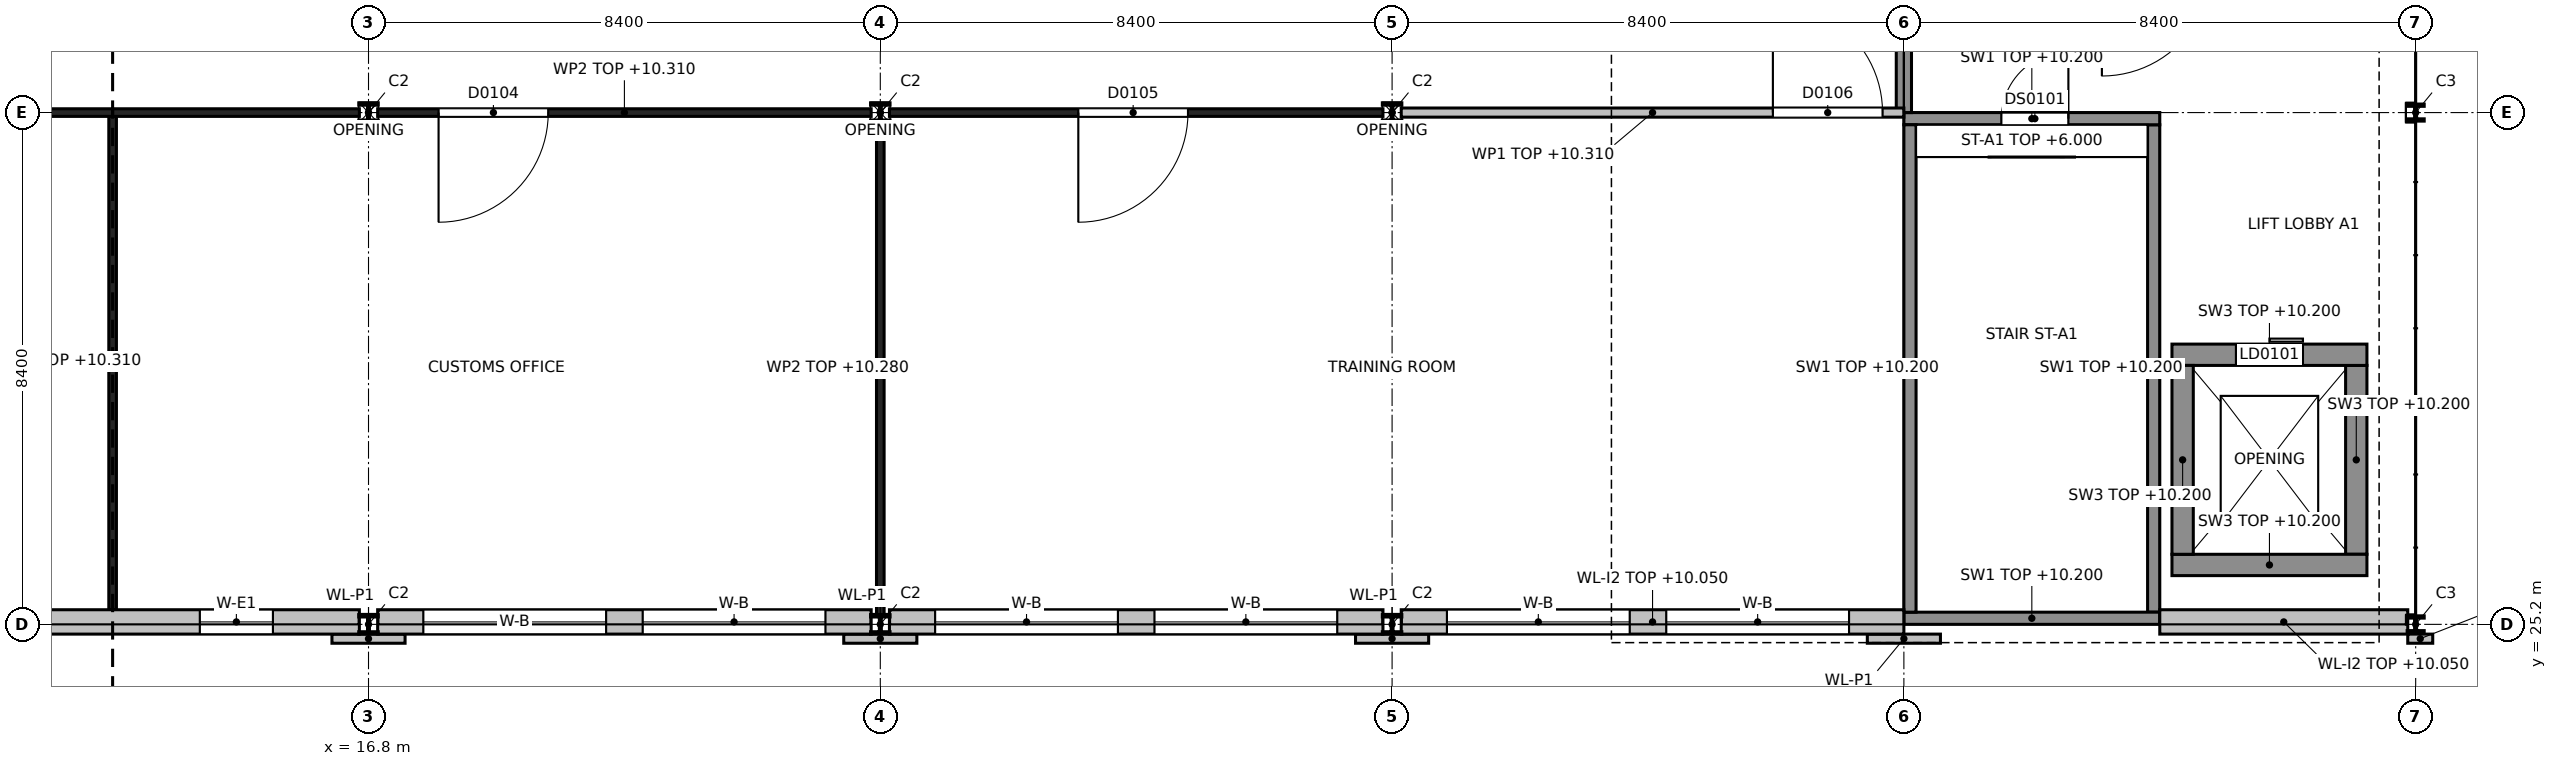
"""IFC4 building model, lengths in metres.
Left out: names, types, materials, properties, quantities, classifications, styles, units other than length and angle.
Written with IfcOpenShell. Run it as: python <this file> out.ifc"""

import sys

from ifc_helpers import new_model, si_unit, direction, frame, frame_2d, origin, origin_2d, place, context, subcontext, project, spatial, rectangle, i_section, extrude, element, fill, save


model = new_model("IFC4")
c1 = context("Model", 3, precision=1e-05, world=origin(), true_north=direction((0.0, 1.0)))
c2 = subcontext(c1, "Body", "Model", "MODEL_VIEW")
j1 = project(units=[si_unit("LENGTHUNIT", "METRE"), si_unit("PLANEANGLEUNIT", "RADIAN")], contexts=[c1])
p1 = place(None, origin())
s1 = spatial("IfcSite", under=j1, at=p1, CompositionType="ELEMENT")
p2 = place(p1, origin())
s2 = spatial("IfcBuilding", under=s1, at=p2, CompositionType="ELEMENT")
p3 = place(p2, frame((0.0, 0.0, 6.0)))
s3 = spatial("IfcBuildingStorey", under=s2, at=p3, CompositionType="ELEMENT", Elevation=6.0)
for number, where, z_axis, x_axis in (
    (1, (16.8, 25.2, 0.0), (0.0, 0.0, 1.0), (1.0, 0.0, 0.0)),
    (2, (16.8, 33.6, 0.0), (0.0, 0.0, 1.0), (1.0, 0.0, 0.0)),
    (3, (25.2, 25.2, 0.0), (0.0, 0.0, 1.0), (1.0, 0.0, 0.0)),
    (4, (25.2, 33.6, 0.0), (0.0, 0.0, 1.0), (1.0, 0.0, 0.0)),
    (5, (33.6, 25.2, 0.0), (0.0, 0.0, 1.0), (1.0, 0.0, 0.0)),
    (6, (33.6, 33.6, 0.0), (0.0, 0.0, 1.0), (1.0, 0.0, 0.0)),
):
    element("IfcColumn", number, at=place(p3, frame(where, z_axis=z_axis, x_axis=x_axis)), inside=s3, PredefinedType="COLUMN", context=c2, shape_type="SweptSolid", body=[
        extrude(i_section(OverallWidth=0.3, OverallDepth=0.3, WebThickness=0.011, FlangeThickness=0.019, at=origin_2d()), origin(), (0.0, 0.0, 1.0), 4.8),
    ])
for number, where, z_axis, x_axis in (
    (7, (50.4, 25.2, 0.0), (0.0, 0.0, 1.0), (1.0, 0.0, 0.0)),
    (8, (50.4, 33.6, 0.0), (0.0, 0.0, 1.0), (1.0, 0.0, 0.0)),
):
    element("IfcColumn", number, at=place(p3, frame(where, z_axis=z_axis, x_axis=x_axis)), inside=s3, PredefinedType="COLUMN", context=c2, shape_type="SweptSolid", body=[
        extrude(i_section(OverallWidth=0.26, OverallDepth=0.26, WebThickness=0.01, FlangeThickness=0.018, at=origin_2d()), origin(), (0.0, 0.0, 1.0), 4.8),
    ])
p4 = place(p3, frame((42.0, 25.3, 0.0), z_axis=(0.0, 0.0, 1.0), x_axis=(1.0, 0.0, 0.0)))
e9 = element("IfcWall", 9, at=p4, inside=s3, PredefinedType="SHEAR", context=c2, shape_type="SweptSolid", body=[
    extrude(rectangle(XDim=4.2, YDim=0.2, at=frame_2d((2.1, 0.0))), origin(), (0.0, 0.0, 1.0), 4.2),
])
p5 = place(p3, frame((42.0, 33.5, 0.0), z_axis=(0.0, 0.0, 1.0), x_axis=(1.0, 0.0, 0.0)))
e10 = element("IfcWall", 10, at=p5, inside=s3, PredefinedType="SHEAR", context=c2, shape_type="SweptSolid", body=[
    extrude(rectangle(XDim=4.2, YDim=0.2, at=frame_2d((2.1, 0.0))), origin(), (0.0, 0.0, 1.0), 4.2),
])
p6 = place(p5, frame((1.6, 0.0, 0.0)))
e11 = element("IfcOpeningElement", 11, at=p6, cuts=e10, PredefinedType="OPENING", context=c2, shape_type="SweptSolid", body=[
    extrude(rectangle(XDim=1.1, YDim=2.1, at=frame_2d((0.55, 1.05))), frame((0.0, 0.1, 0.0), z_axis=(0.0, -1.0, 0.0), x_axis=(1.0, 0.0, 0.0)), (0.0, 0.0, 1.0), 0.2),
])
for number, where, z_axis, x_axis in (
    (12, (42.1, 25.4, 0.0), (0.0, 0.0, 1.0), (0.0, 1.0, 0.0)),
    (13, (46.1, 25.4, 0.0), (0.0, 0.0, 1.0), (0.0, 1.0, 0.0)),
):
    element("IfcWall", number, at=place(p3, frame(where, z_axis=z_axis, x_axis=x_axis)), inside=s3, PredefinedType="SHEAR", context=c2, shape_type="SweptSolid", body=[
        extrude(rectangle(XDim=8.0, YDim=0.2, at=frame_2d((4.0, 0.0))), origin(), (0.0, 0.0, 1.0), 4.2),
    ])
p7 = place(p3, frame((46.4, 26.175, 0.0), z_axis=(0.0, 0.0, 1.0), x_axis=(1.0, 0.0, 0.0)))
e14 = element("IfcWall", 14, at=p7, inside=s3, PredefinedType="SHEAR", context=c2, shape_type="SweptSolid", body=[
    extrude(rectangle(XDim=3.2, YDim=0.35, at=frame_2d((1.6, 0.0))), origin(), (0.0, 0.0, 1.0), 4.2),
])
p8 = place(p3, frame((46.4, 29.625, 0.0), z_axis=(0.0, 0.0, 1.0), x_axis=(1.0, 0.0, 0.0)))
e15 = element("IfcWall", 15, at=p8, inside=s3, PredefinedType="SHEAR", context=c2, shape_type="SweptSolid", body=[
    extrude(rectangle(XDim=3.2, YDim=0.35, at=frame_2d((1.6, 0.0))), origin(), (0.0, 0.0, 1.0), 4.2),
])
p9 = place(p8, frame((1.05, 0.0, 0.0)))
e16 = element("IfcOpeningElement", 16, at=p9, cuts=e15, PredefinedType="OPENING", context=c2, shape_type="SweptSolid", body=[
    extrude(rectangle(XDim=1.1, YDim=2.1, at=frame_2d((0.55, 1.05))), frame((0.0, 0.175, 0.0), z_axis=(0.0, -1.0, 0.0), x_axis=(1.0, 0.0, 0.0)), (0.0, 0.0, 1.0), 0.35),
])
for number, where, z_axis, x_axis in (
    (17, (46.575, 26.35, 0.0), (0.0, 0.0, 1.0), (0.0, 1.0, 0.0)),
    (18, (49.425, 26.35, 0.0), (0.0, 0.0, 1.0), (0.0, 1.0, 0.0)),
):
    element("IfcWall", number, at=place(p3, frame(where, z_axis=z_axis, x_axis=x_axis)), inside=s3, PredefinedType="SHEAR", context=c2, shape_type="SweptSolid", body=[
        extrude(rectangle(XDim=3.1, YDim=0.35, at=frame_2d((1.55, 0.0))), origin(), (0.0, 0.0, 1.0), 4.2),
    ])
p10 = place(p3, frame((8.55, 25.24, 0.0), z_axis=(0.0, 0.0, 1.0), x_axis=(1.0, 0.0, 0.0)))
e19 = element("IfcWall", 19, at=p10, inside=s3, PredefinedType="SOLIDWALL", context=c2, shape_type="SweptSolid", body=[
    extrude(rectangle(XDim=8.1, YDim=0.4, at=frame_2d((4.05, 0.0))), origin(), (0.0, 0.0, 1.0), 4.05),
])
p11 = place(p10, frame((1.419, 0.0, 0.9)))
e20 = element("IfcOpeningElement", 20, at=p11, cuts=e19, PredefinedType="OPENING", context=c2, shape_type="SweptSolid", body=[
    extrude(rectangle(XDim=1.2, YDim=3.0, at=frame_2d((0.6, 1.5))), frame((0.0, 0.2, 0.0), z_axis=(0.0, -1.0, 0.0), x_axis=(1.0, 0.0, 0.0)), (0.0, 0.0, 1.0), 0.4),
])
p12 = place(p10, frame((5.481, 0.0, 0.9)))
e21 = element("IfcOpeningElement", 21, at=p12, cuts=e19, PredefinedType="OPENING", context=c2, shape_type="SweptSolid", body=[
    extrude(rectangle(XDim=1.2, YDim=3.0, at=frame_2d((0.6, 1.5))), frame((0.0, 0.2, 0.0), z_axis=(0.0, -1.0, 0.0), x_axis=(1.0, 0.0, 0.0)), (0.0, 0.0, 1.0), 0.4),
])
p13 = place(p3, frame((16.95, 25.24, 0.0), z_axis=(0.0, 0.0, 1.0), x_axis=(1.0, 0.0, 0.0)))
e22 = element("IfcWall", 22, at=p13, inside=s3, PredefinedType="SOLIDWALL", context=c2, shape_type="SweptSolid", body=[
    extrude(rectangle(XDim=8.1, YDim=0.4, at=frame_2d((4.05, 0.0))), origin(), (0.0, 0.0, 1.0), 4.05),
])
p14 = place(p13, frame((0.75, 0.0, 0.9)))
e23 = element("IfcOpeningElement", 23, at=p14, cuts=e22, PredefinedType="OPENING", context=c2, shape_type="SweptSolid", body=[
    extrude(rectangle(XDim=3.0, YDim=3.0, at=frame_2d((1.5, 1.5))), frame((0.0, 0.2, 0.0), z_axis=(0.0, -1.0, 0.0), x_axis=(1.0, 0.0, 0.0)), (0.0, 0.0, 1.0), 0.4),
])
p15 = place(p13, frame((4.35, 0.0, 0.9)))
e24 = element("IfcOpeningElement", 24, at=p15, cuts=e22, PredefinedType="OPENING", context=c2, shape_type="SweptSolid", body=[
    extrude(rectangle(XDim=3.0, YDim=3.0, at=frame_2d((1.5, 1.5))), frame((0.0, 0.2, 0.0), z_axis=(0.0, -1.0, 0.0), x_axis=(1.0, 0.0, 0.0)), (0.0, 0.0, 1.0), 0.4),
])
p16 = place(p3, frame((25.35, 25.24, 0.0), z_axis=(0.0, 0.0, 1.0), x_axis=(1.0, 0.0, 0.0)))
e25 = element("IfcWall", 25, at=p16, inside=s3, PredefinedType="SOLIDWALL", context=c2, shape_type="SweptSolid", body=[
    extrude(rectangle(XDim=8.1, YDim=0.4, at=frame_2d((4.05, 0.0))), origin(), (0.0, 0.0, 1.0), 4.05),
])
p17 = place(p16, frame((0.75, 0.0, 0.9)))
e26 = element("IfcOpeningElement", 26, at=p17, cuts=e25, PredefinedType="OPENING", context=c2, shape_type="SweptSolid", body=[
    extrude(rectangle(XDim=3.0, YDim=3.0, at=frame_2d((1.5, 1.5))), frame((0.0, 0.2, 0.0), z_axis=(0.0, -1.0, 0.0), x_axis=(1.0, 0.0, 0.0)), (0.0, 0.0, 1.0), 0.4),
])
p18 = place(p16, frame((4.35, 0.0, 0.9)))
e27 = element("IfcOpeningElement", 27, at=p18, cuts=e25, PredefinedType="OPENING", context=c2, shape_type="SweptSolid", body=[
    extrude(rectangle(XDim=3.0, YDim=3.0, at=frame_2d((1.5, 1.5))), frame((0.0, 0.2, 0.0), z_axis=(0.0, -1.0, 0.0), x_axis=(1.0, 0.0, 0.0)), (0.0, 0.0, 1.0), 0.4),
])
p19 = place(p3, frame((33.75, 25.24, 0.0), z_axis=(0.0, 0.0, 1.0), x_axis=(1.0, 0.0, 0.0)))
e28 = element("IfcWall", 28, at=p19, inside=s3, PredefinedType="SOLIDWALL", context=c2, shape_type="SweptSolid", body=[
    extrude(rectangle(XDim=8.25, YDim=0.4, at=frame_2d((4.125, 0.0))), origin(), (0.0, 0.0, 1.0), 4.05),
])
p20 = place(p19, frame((0.75, 0.0, 0.9)))
e29 = element("IfcOpeningElement", 29, at=p20, cuts=e28, PredefinedType="OPENING", context=c2, shape_type="SweptSolid", body=[
    extrude(rectangle(XDim=3.0, YDim=3.0, at=frame_2d((1.5, 1.5))), frame((0.0, 0.2, 0.0), z_axis=(0.0, -1.0, 0.0), x_axis=(1.0, 0.0, 0.0)), (0.0, 0.0, 1.0), 0.4),
])
p21 = place(p19, frame((4.35, 0.0, 0.9)))
e30 = element("IfcOpeningElement", 30, at=p21, cuts=e28, PredefinedType="OPENING", context=c2, shape_type="SweptSolid", body=[
    extrude(rectangle(XDim=3.0, YDim=3.0, at=frame_2d((1.5, 1.5))), frame((0.0, 0.2, 0.0), z_axis=(0.0, -1.0, 0.0), x_axis=(1.0, 0.0, 0.0)), (0.0, 0.0, 1.0), 0.4),
])
p22 = place(p3, frame((46.2, 25.24, 0.0), z_axis=(0.0, 0.0, 1.0), x_axis=(1.0, 0.0, 0.0)))
e31 = element("IfcWall", 31, at=p22, inside=s3, PredefinedType="SOLIDWALL", context=c2, shape_type="SweptSolid", body=[
    extrude(rectangle(XDim=4.07, YDim=0.4, at=frame_2d((2.035, 0.0))), origin(), (0.0, 0.0, 1.0), 4.05),
])
for number, where, z_axis, x_axis in (
    (32, (16.2, 24.965, 0.0), (0.0, 0.0, 1.0), (1.0, 0.0, 0.0)),
    (33, (24.6, 24.965, 0.0), (0.0, 0.0, 1.0), (1.0, 0.0, 0.0)),
    (34, (33.0, 24.965, 0.0), (0.0, 0.0, 1.0), (1.0, 0.0, 0.0)),
):
    element("IfcWall", number, at=place(p3, frame(where, z_axis=z_axis, x_axis=x_axis)), inside=s3, PredefinedType="SOLIDWALL", context=c2, shape_type="SweptSolid", body=[
        extrude(rectangle(XDim=1.2, YDim=0.15, at=frame_2d((0.6, 0.0))), origin(), (0.0, 0.0, 1.0), 4.8),
    ])
p23 = place(p3, frame((41.4, 24.965, 0.0), z_axis=(0.0, 0.0, 1.0), x_axis=(1.0, 0.0, 0.0)))
e35 = element("IfcWall", 35, at=p23, inside=s3, PredefinedType="SOLIDWALL", context=c2, shape_type="SweptSolid", body=[
    extrude(rectangle(XDim=1.2, YDim=0.15, at=frame_2d((0.6, 0.0))), origin(), (0.0, 0.0, 1.0), 4.8),
])
p24 = place(p3, frame((50.27, 24.965, 0.0), z_axis=(0.0, 0.0, 1.0), x_axis=(1.0, 0.0, 0.0)))
e36 = element("IfcWall", 36, at=p24, inside=s3, PredefinedType="SOLIDWALL", context=c2, shape_type="SweptSolid", body=[
    extrude(rectangle(XDim=0.41, YDim=0.15, at=frame_2d((0.205, 0.0))), origin(), (0.0, 0.0, 1.0), 4.8),
])
p25 = place(p3, frame((42.0, 33.6, 0.0), z_axis=(0.0, 0.0, 1.0), x_axis=(0.0, 1.0, 0.0)))
e37 = element("IfcWall", 37, at=p25, inside=s3, PredefinedType="PARTITIONING", context=c2, shape_type="SweptSolid", body=[
    extrude(rectangle(XDim=2.4, YDim=0.25, at=frame_2d((1.2, 0.0))), origin(), (0.0, 0.0, 1.0), 4.26),
])
p26 = place(p3, frame((12.6, 25.44, 0.0), z_axis=(0.0, 0.0, 1.0), x_axis=(0.0, 1.0, 0.0)))
e38 = element("IfcWall", 38, at=p26, inside=s3, PredefinedType="PARTITIONING", context=c2, shape_type="SweptSolid", body=[
    extrude(rectangle(XDim=8.16, YDim=0.125, at=frame_2d((4.08, 0.0))), origin(), (0.0, 0.0, 1.0), 4.31),
])
p27 = place(p3, frame((8.55, 33.6, 0.0), z_axis=(0.0, 0.0, 1.0), x_axis=(1.0, 0.0, 0.0)))
e39 = element("IfcWall", 39, at=p27, inside=s3, PredefinedType="PARTITIONING", context=c2, shape_type="SweptSolid", body=[
    extrude(rectangle(XDim=4.05, YDim=0.125, at=frame_2d((2.025, 0.0))), origin(), (0.0, 0.0, 1.0), 4.31),
])
p28 = place(p27, frame((1.45, 0.0, 0.0)))
e40 = element("IfcOpeningElement", 40, at=p28, cuts=e39, PredefinedType="OPENING", context=c2, shape_type="SweptSolid", body=[
    extrude(rectangle(XDim=1.0, YDim=2.2, at=frame_2d((0.5, 1.1))), frame((0.0, 0.062, 0.0), z_axis=(0.0, -1.0, 0.0), x_axis=(1.0, 0.0, 0.0)), (0.0, 0.0, 1.0), 0.125),
])
p29 = place(p3, frame((25.2, 25.35, 0.0), z_axis=(0.0, 0.0, 1.0), x_axis=(0.0, 1.0, 0.0)))
e41 = element("IfcWall", 41, at=p29, inside=s3, PredefinedType="PARTITIONING", context=c2, shape_type="SweptSolid", body=[
    extrude(rectangle(XDim=8.1, YDim=0.125, at=frame_2d((4.05, 0.0))), origin(), (0.0, 0.0, 1.0), 4.28),
])
p30 = place(p3, frame((12.6, 33.6, 0.0), z_axis=(0.0, 0.0, 1.0), x_axis=(1.0, 0.0, 0.0)))
e42 = element("IfcWall", 42, at=p30, inside=s3, PredefinedType="PARTITIONING", context=c2, shape_type="SweptSolid", body=[
    extrude(rectangle(XDim=4.05, YDim=0.125, at=frame_2d((2.025, 0.0))), origin(), (0.0, 0.0, 1.0), 4.31),
])
p31 = place(p3, frame((16.95, 33.6, 0.0), z_axis=(0.0, 0.0, 1.0), x_axis=(1.0, 0.0, 0.0)))
e43 = element("IfcWall", 43, at=p31, inside=s3, PredefinedType="PARTITIONING", context=c2, shape_type="SweptSolid", body=[
    extrude(rectangle(XDim=8.1, YDim=0.125, at=frame_2d((4.05, 0.0))), origin(), (0.0, 0.0, 1.0), 4.31),
])
p32 = place(p31, frame((1.0, 0.0, 0.0)))
e44 = element("IfcOpeningElement", 44, at=p32, cuts=e43, PredefinedType="OPENING", context=c2, shape_type="SweptSolid", body=[
    extrude(rectangle(XDim=1.8, YDim=2.1, at=frame_2d((0.9, 1.05))), frame((0.0, 0.062, 0.0), z_axis=(0.0, -1.0, 0.0), x_axis=(1.0, 0.0, 0.0)), (0.0, 0.0, 1.0), 0.125),
])
p33 = place(p3, frame((25.35, 33.6, 0.0), z_axis=(0.0, 0.0, 1.0), x_axis=(1.0, 0.0, 0.0)))
e45 = element("IfcWall", 45, at=p33, inside=s3, PredefinedType="PARTITIONING", context=c2, shape_type="SweptSolid", body=[
    extrude(rectangle(XDim=8.1, YDim=0.125, at=frame_2d((4.05, 0.0))), origin(), (0.0, 0.0, 1.0), 4.31),
])
p34 = place(p33, frame((3.1, 0.0, 0.0)))
e46 = element("IfcOpeningElement", 46, at=p34, cuts=e45, PredefinedType="OPENING", context=c2, shape_type="SweptSolid", body=[
    extrude(rectangle(XDim=1.8, YDim=2.1, at=frame_2d((0.9, 1.05))), frame((0.0, 0.062, 0.0), z_axis=(0.0, -1.0, 0.0), x_axis=(1.0, 0.0, 0.0)), (0.0, 0.0, 1.0), 0.125),
])
p35 = place(p3, frame((33.75, 33.6, 0.0), z_axis=(0.0, 0.0, 1.0), x_axis=(1.0, 0.0, 0.0)))
e47 = element("IfcWall", 47, at=p35, inside=s3, PredefinedType="PARTITIONING", context=c2, shape_type="SweptSolid", body=[
    extrude(rectangle(XDim=8.25, YDim=0.15, at=frame_2d((4.125, 0.0))), origin(), (0.0, 0.0, 1.0), 4.31),
])
p36 = place(p35, frame((6.1, 0.0, 0.0)))
e48 = element("IfcOpeningElement", 48, at=p36, cuts=e47, PredefinedType="OPENING", context=c2, shape_type="SweptSolid", body=[
    extrude(rectangle(XDim=1.8, YDim=2.1, at=frame_2d((0.9, 1.05))), frame((0.0, 0.075, 0.0), z_axis=(0.0, -1.0, 0.0), x_axis=(1.0, 0.0, 0.0)), (0.0, 0.0, 1.0), 0.15),
])
p37 = place(p12, origin())
e49 = element("IfcWindow", 49, at=p37, inside=s3, PartitioningType="SINGLE_PANEL", PredefinedType="WINDOW", context=c2, shape_type="SweptSolid", body=[
    extrude(rectangle(XDim=1.2, YDim=3.0, at=frame_2d((0.6, 1.5))), frame((0.0, 0.03, 0.0), z_axis=(0.0, -1.0, 0.0), x_axis=(1.0, 0.0, 0.0)), (0.0, 0.0, 1.0), 0.06),
])
fill(e21, e49)
p38 = place(p14, origin())
e50 = element("IfcWindow", 50, at=p38, inside=s3, PartitioningType="SINGLE_PANEL", PredefinedType="WINDOW", context=c2, shape_type="SweptSolid", body=[
    extrude(rectangle(XDim=3.0, YDim=3.0, at=frame_2d((1.5, 1.5))), frame((0.0, 0.03, 0.0), z_axis=(0.0, -1.0, 0.0), x_axis=(1.0, 0.0, 0.0)), (0.0, 0.0, 1.0), 0.06),
])
fill(e23, e50)
p39 = place(p15, origin())
e51 = element("IfcWindow", 51, at=p39, inside=s3, PartitioningType="SINGLE_PANEL", PredefinedType="WINDOW", context=c2, shape_type="SweptSolid", body=[
    extrude(rectangle(XDim=3.0, YDim=3.0, at=frame_2d((1.5, 1.5))), frame((0.0, 0.03, 0.0), z_axis=(0.0, -1.0, 0.0), x_axis=(1.0, 0.0, 0.0)), (0.0, 0.0, 1.0), 0.06),
])
fill(e24, e51)
p40 = place(p17, origin())
e52 = element("IfcWindow", 52, at=p40, inside=s3, PartitioningType="SINGLE_PANEL", PredefinedType="WINDOW", context=c2, shape_type="SweptSolid", body=[
    extrude(rectangle(XDim=3.0, YDim=3.0, at=frame_2d((1.5, 1.5))), frame((0.0, 0.03, 0.0), z_axis=(0.0, -1.0, 0.0), x_axis=(1.0, 0.0, 0.0)), (0.0, 0.0, 1.0), 0.06),
])
fill(e26, e52)
p41 = place(p18, origin())
e53 = element("IfcWindow", 53, at=p41, inside=s3, PartitioningType="SINGLE_PANEL", PredefinedType="WINDOW", context=c2, shape_type="SweptSolid", body=[
    extrude(rectangle(XDim=3.0, YDim=3.0, at=frame_2d((1.5, 1.5))), frame((0.0, 0.03, 0.0), z_axis=(0.0, -1.0, 0.0), x_axis=(1.0, 0.0, 0.0)), (0.0, 0.0, 1.0), 0.06),
])
fill(e27, e53)
p42 = place(p20, origin())
e54 = element("IfcWindow", 54, at=p42, inside=s3, PartitioningType="SINGLE_PANEL", PredefinedType="WINDOW", context=c2, shape_type="SweptSolid", body=[
    extrude(rectangle(XDim=3.0, YDim=3.0, at=frame_2d((1.5, 1.5))), frame((0.0, 0.03, 0.0), z_axis=(0.0, -1.0, 0.0), x_axis=(1.0, 0.0, 0.0)), (0.0, 0.0, 1.0), 0.06),
])
fill(e29, e54)
p43 = place(p21, origin())
e55 = element("IfcWindow", 55, at=p43, inside=s3, PartitioningType="SINGLE_PANEL", PredefinedType="WINDOW", context=c2, shape_type="SweptSolid", body=[
    extrude(rectangle(XDim=3.0, YDim=3.0, at=frame_2d((1.5, 1.5))), frame((0.0, 0.03, 0.0), z_axis=(0.0, -1.0, 0.0), x_axis=(1.0, 0.0, 0.0)), (0.0, 0.0, 1.0), 0.06),
])
fill(e30, e55)
p44 = place(p32, origin())
e56 = element("IfcDoor", 56, at=p44, inside=s3, OperationType="DOUBLE_DOOR_DOUBLE_SWING", PredefinedType="DOOR", context=c2, shape_type="SweptSolid", body=[
    extrude(rectangle(XDim=1.8, YDim=2.1, at=frame_2d((0.9, 1.05))), frame((0.0, 0.025, 0.0), z_axis=(0.0, -1.0, 0.0), x_axis=(1.0, 0.0, 0.0)), (0.0, 0.0, 1.0), 0.05),
])
fill(e44, e56)
p45 = place(p34, origin())
e57 = element("IfcDoor", 57, at=p45, inside=s3, OperationType="DOUBLE_DOOR_DOUBLE_SWING", PredefinedType="DOOR", context=c2, shape_type="SweptSolid", body=[
    extrude(rectangle(XDim=1.8, YDim=2.1, at=frame_2d((0.9, 1.05))), frame((0.0, 0.025, 0.0), z_axis=(0.0, -1.0, 0.0), x_axis=(1.0, 0.0, 0.0)), (0.0, 0.0, 1.0), 0.05),
])
fill(e46, e57)
p46 = place(p36, origin())
e58 = element("IfcDoor", 58, at=p46, inside=s3, OperationType="DOUBLE_DOOR_DOUBLE_SWING", PredefinedType="DOOR", context=c2, shape_type="SweptSolid", body=[
    extrude(rectangle(XDim=1.8, YDim=2.1, at=frame_2d((0.9, 1.05))), frame((0.0, 0.025, 0.0), z_axis=(0.0, -1.0, 0.0), x_axis=(1.0, 0.0, 0.0)), (0.0, 0.0, 1.0), 0.05),
])
fill(e48, e58)
p47 = place(p6, origin())
e59 = element("IfcDoor", 59, at=p47, inside=s3, OperationType="SINGLE_SWING_RIGHT", PredefinedType="DOOR", context=c2, shape_type="SweptSolid", body=[
    extrude(rectangle(XDim=1.1, YDim=2.1, at=frame_2d((0.55, 1.05))), frame((0.0, 0.025, 0.0), z_axis=(0.0, -1.0, 0.0), x_axis=(1.0, 0.0, 0.0)), (0.0, 0.0, 1.0), 0.05),
])
fill(e11, e59)
p48 = place(p9, origin())
e60 = element("IfcDoor", 60, at=p48, inside=s3, OperationType="SLIDING_TO_LEFT", PredefinedType="DOOR", context=c2, shape_type="SweptSolid", body=[
    extrude(rectangle(XDim=1.1, YDim=2.1, at=frame_2d((0.55, 1.05))), frame((0.0, 0.025, 0.0), z_axis=(0.0, -1.0, 0.0), x_axis=(1.0, 0.0, 0.0)), (0.0, 0.0, 1.0), 0.05),
])
fill(e16, e60)
save(model, sys.argv[1])
